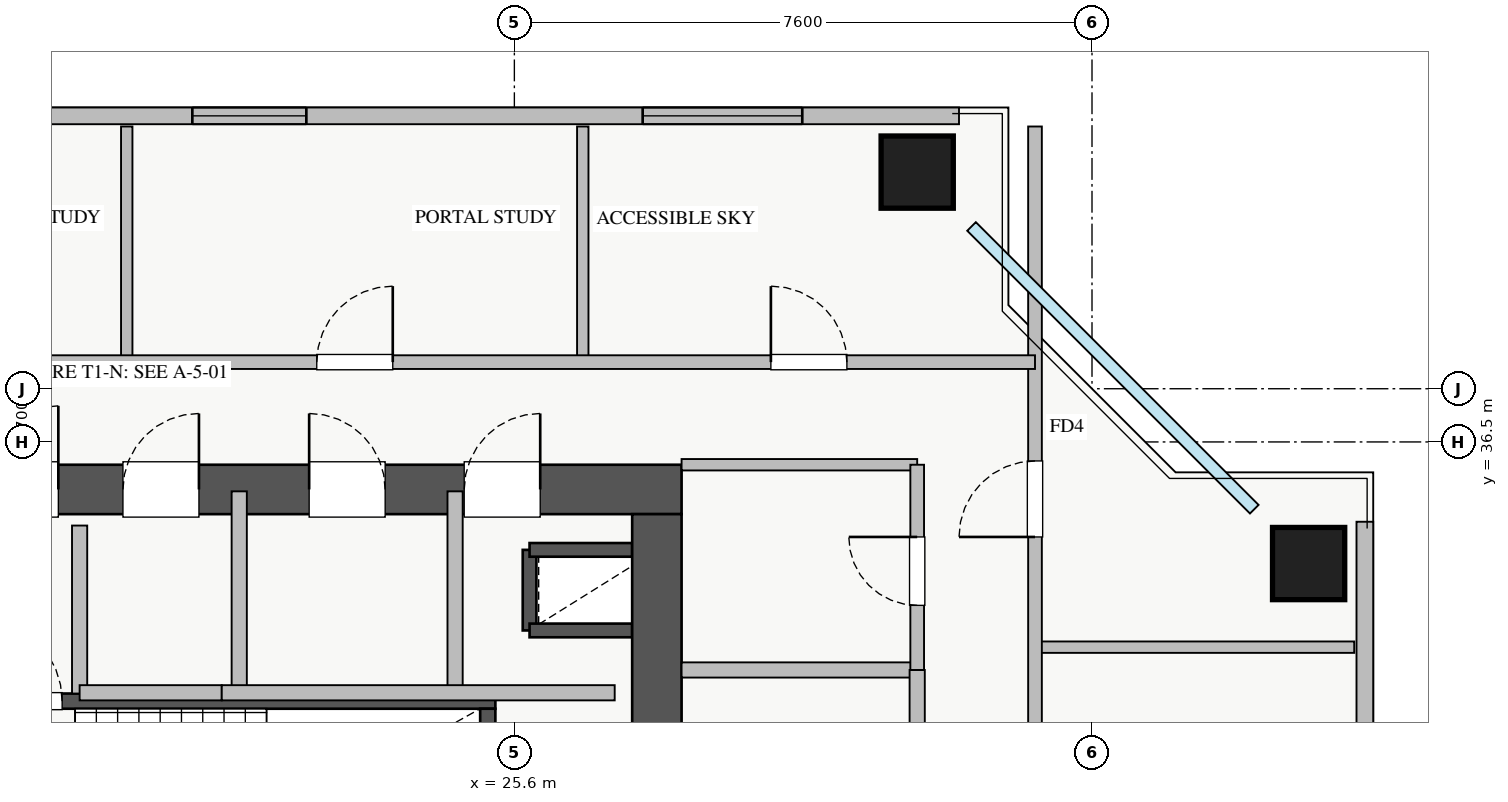
"""IFC4 building model, lengths in metres.
Left out: names, types, materials, properties, quantities, classifications, styles, units other than length and angle.
Written with IfcOpenShell. Run it as: python <this file> out.ifc"""

import sys

from ifc_helpers import new_model, si_unit, direction, frame, frame_2d, origin, origin_2d, place, context, subcontext, project, spatial, rectangle, extrude, source, transform, mapped, element, fill, save


model = new_model("IFC4")
c1 = context("Model", 3, precision=1e-05, world=origin(), true_north=direction((0.0, 1.0)))
c2 = subcontext(c1, "Body", "Model", "MODEL_VIEW")
j1 = project(units=[si_unit("LENGTHUNIT", "METRE"), si_unit("PLANEANGLEUNIT", "RADIAN")], contexts=[c1])
p1 = place(None, origin())
s1 = spatial("IfcSite", under=j1, at=p1, CompositionType="ELEMENT")
p2 = place(p1, origin())
s2 = spatial("IfcBuilding", under=s1, at=p2, CompositionType="ELEMENT")
p3 = place(p2, frame((0.0, 0.0, 169.75)))
s3 = spatial("IfcBuildingStorey", under=s2, at=p3, CompositionType="ELEMENT", Elevation=169.75)
p4 = place(p3, frame((25.8, 34.02, 0.0), z_axis=(0.0, 0.0, 1.0), x_axis=(0.0, 1.0, 0.0)))
e1 = element("IfcWall", 1, at=p4, inside=s3, PredefinedType="SHEAR", context=c2, shape_type="SweptSolid", body=[
    extrude(rectangle(XDim=1.06, YDim=0.18, at=frame_2d((0.53, 0.0))), origin(), (0.0, 0.0, 1.0), 3.0),
])
for number, where, z_axis, x_axis in (
    (2, (25.8, 35.08, 0.0), (0.0, 0.0, 1.0), (1.0, 0.0, 0.0)),
    (3, (25.8, 34.02, 0.0), (0.0, 0.0, 1.0), (1.0, 0.0, 0.0)),
):
    element("IfcWall", number, at=place(p3, frame(where, z_axis=z_axis, x_axis=x_axis)), inside=s3, PredefinedType="SHEAR", context=c2, shape_type="SweptSolid", body=[
        extrude(rectangle(XDim=1.35, YDim=0.18, at=frame_2d((0.675, 0.0))), origin(), (0.0, 0.0, 1.0), 3.0),
    ])
p5 = place(p3, frame((18.2, 33.09, 0.0), z_axis=(0.0, 0.0, 1.0), x_axis=(1.0, 0.0, 0.0)))
e4 = element("IfcWall", 4, at=p5, inside=s3, PredefinedType="SHEAR", context=c2, shape_type="SweptSolid", body=[
    extrude(rectangle(XDim=7.15, YDim=0.2, at=frame_2d((3.575, 0.0))), origin(), (0.0, 0.0, 1.0), 3.25),
])
p6 = place(p5, frame((0.35, 0.0, 0.0)))
e5 = element("IfcOpeningElement", 5, at=p6, cuts=e4, PredefinedType="OPENING", context=c2, shape_type="SweptSolid", body=[
    extrude(rectangle(XDim=1.1, YDim=2.05, at=frame_2d((0.55, 1.025))), frame((0.0, 0.11, 0.0), z_axis=(0.0, -1.0, 0.0), x_axis=(1.0, 0.0, 0.0)), (0.0, 0.0, 1.0), 0.22),
])
p7 = place(p3, frame((25.25, 30.05, 0.0), z_axis=(0.0, 0.0, 1.0), x_axis=(0.0, 1.0, 0.0)))
e6 = element("IfcWall", 6, at=p7, inside=s3, PredefinedType="SHEAR", context=c2, shape_type="SweptSolid", body=[
    extrude(rectangle(XDim=2.94, YDim=0.2, at=frame_2d((1.47, 0.0))), origin(), (0.0, 0.0, 1.0), 3.25),
])
p8 = place(p3, frame((10.2, 35.875, 0.0), z_axis=(0.0, 0.0, 1.0), x_axis=(1.0, 0.0, 0.0)))
e7 = element("IfcWall", 7, at=p8, inside=s3, PredefinedType="SHEAR", context=c2, shape_type="SweptSolid", body=[
    extrude(rectangle(XDim=17.6, YDim=0.65, at=frame_2d((8.8, 0.0))), origin(), (0.0, 0.0, 1.0), 3.25),
])
p9 = place(p8, frame((1.15, 0.0, 0.0)))
e8 = element("IfcOpeningElement", 8, at=p9, cuts=e7, PredefinedType="OPENING", context=c2, shape_type="SweptSolid", body=[
    extrude(rectangle(XDim=1.1, YDim=2.05, at=frame_2d((0.55, 1.025))), frame((0.0, 0.335, 0.0), z_axis=(0.0, -1.0, 0.0), x_axis=(1.0, 0.0, 0.0)), (0.0, 0.0, 1.0), 0.67),
])
p10 = place(p8, frame((8.3, 0.0, 0.0)))
e9 = element("IfcOpeningElement", 9, at=p10, cuts=e7, PredefinedType="OPENING", context=c2, shape_type="SweptSolid", body=[
    extrude(rectangle(XDim=1.1, YDim=2.05, at=frame_2d((0.55, 1.025))), frame((0.0, 0.335, 0.0), z_axis=(0.0, -1.0, 0.0), x_axis=(1.0, 0.0, 0.0)), (0.0, 0.0, 1.0), 0.67),
])
p11 = place(p8, frame((4.9, 0.0, 0.0)))
e10 = element("IfcOpeningElement", 10, at=p11, cuts=e7, PredefinedType="OPENING", context=c2, shape_type="SweptSolid", body=[
    extrude(rectangle(XDim=1.1, YDim=2.05, at=frame_2d((0.55, 1.025))), frame((0.0, 0.335, 0.0), z_axis=(0.0, -1.0, 0.0), x_axis=(1.0, 0.0, 0.0)), (0.0, 0.0, 1.0), 0.67),
])
p12 = place(p8, frame((14.74, 0.0, 0.0)))
e11 = element("IfcOpeningElement", 11, at=p12, cuts=e7, PredefinedType="OPENING", context=c2, shape_type="SweptSolid", body=[
    extrude(rectangle(XDim=1.0, YDim=2.05, at=frame_2d((0.5, 1.025))), frame((0.0, 0.335, 0.0), z_axis=(0.0, -1.0, 0.0), x_axis=(1.0, 0.0, 0.0)), (0.0, 0.0, 1.0), 0.67),
])
p13 = place(p8, frame((10.25, 0.0, 0.0)))
e12 = element("IfcOpeningElement", 12, at=p13, cuts=e7, PredefinedType="OPENING", context=c2, shape_type="SweptSolid", body=[
    extrude(rectangle(XDim=1.0, YDim=2.05, at=frame_2d((0.5, 1.025))), frame((0.0, 0.335, 0.0), z_axis=(0.0, -1.0, 0.0), x_axis=(1.0, 0.0, 0.0)), (0.0, 0.0, 1.0), 0.67),
])
p14 = place(p8, frame((12.7, 0.0, 0.0)))
e13 = element("IfcOpeningElement", 13, at=p14, cuts=e7, PredefinedType="OPENING", context=c2, shape_type="SweptSolid", body=[
    extrude(rectangle(XDim=1.0, YDim=2.05, at=frame_2d((0.5, 1.025))), frame((0.0, 0.335, 0.0), z_axis=(0.0, -1.0, 0.0), x_axis=(1.0, 0.0, 0.0)), (0.0, 0.0, 1.0), 0.67),
])
p15 = place(p3, frame((27.475, 29.65, 0.0), z_axis=(0.0, 0.0, 1.0), x_axis=(0.0, 1.0, 0.0)))
e14 = element("IfcWall", 14, at=p15, inside=s3, PredefinedType="SHEAR", context=c2, shape_type="SweptSolid", body=[
    extrude(rectangle(XDim=5.9, YDim=0.65, at=frame_2d((2.95, 0.0))), origin(), (0.0, 0.0, 1.0), 3.25),
])
p16 = place(p15, frame((1.1, 0.0, 0.0)))
e15 = element("IfcOpeningElement", 15, at=p16, cuts=e14, PredefinedType="OPENING", context=c2, shape_type="SweptSolid", body=[
    extrude(rectangle(XDim=1.3, YDim=2.05, at=frame_2d((0.65, 1.025))), frame((0.0, 0.335, 0.0), z_axis=(0.0, -1.0, 0.0), x_axis=(1.0, 0.0, 0.0)), (0.0, 0.0, 1.0), 0.67),
])
m1 = source(origin(), c2, "Body", "SweptSolid", [
    extrude(rectangle(XDim=0.95, YDim=0.95, at=origin_2d()), origin(), (0.0, 0.0, 1.0), 3.25),
])
for number, where, z_axis, x_axis in (
    (16, (36.05, 34.9, 0.0), (0.0, 0.0, 1.0), (1.0, 0.0, 0.0)),
    (17, (30.9, 40.05, 0.0), (0.0, 0.0, 1.0), (1.0, 0.0, 0.0)),
):
    element("IfcColumn", number, at=place(p3, frame(where, z_axis=z_axis, x_axis=x_axis)), inside=s3, PredefinedType="COLUMN", context=c2, shape_type="MappedRepresentation", body=[
        mapped(m1, transform((0.0, 0.0, 0.0), x_axis=(1.0, 0.0, 0.0), y_axis=(0.0, 1.0, 0.0), z_axis=(0.0, 0.0, 1.0), scale=1.0)),
    ])
p17 = place(p3, frame((36.79, 29.15, 0.0), z_axis=(0.0, 0.0, 1.0), x_axis=(0.0, 1.0, 0.0)))
e18 = element("IfcWall", 18, at=p17, inside=s3, PredefinedType="STANDARD", context=c2, shape_type="SweptSolid", body=[
    extrude(rectangle(XDim=6.3, YDim=0.22, at=frame_2d((3.15, 0.0))), origin(), (0.0, 0.0, 1.0), 2.54),
])
p18 = place(p3, frame((6.55, 40.79, 0.0), z_axis=(0.0, 0.0, 1.0), x_axis=(1.0, 0.0, 0.0)))
e19 = element("IfcWall", 19, at=p18, inside=s3, PredefinedType="STANDARD", context=c2, shape_type="SweptSolid", body=[
    extrude(rectangle(XDim=24.9, YDim=0.22, at=frame_2d((12.45, 0.0))), origin(), (0.0, 0.0, 1.0), 2.54),
])
p19 = place(p18, frame((3.833, 0.0, 0.9)))
e20 = element("IfcOpeningElement", 20, at=p19, cuts=e19, PredefinedType="OPENING", context=c2, shape_type="SweptSolid", body=[
    extrude(rectangle(XDim=2.4, YDim=1.5, at=frame_2d((1.2, 0.75))), frame((0.0, 0.12, 0.0), z_axis=(0.0, -1.0, 0.0), x_axis=(1.0, 0.0, 0.0)), (0.0, 0.0, 1.0), 0.24),
])
p20 = place(p18, frame((8.438, 0.0, 0.9)))
e21 = element("IfcOpeningElement", 21, at=p20, cuts=e19, PredefinedType="OPENING", context=c2, shape_type="SweptSolid", body=[
    extrude(rectangle(XDim=1.8, YDim=1.45, at=frame_2d((0.9, 0.725))), frame((0.0, 0.12, 0.0), z_axis=(0.0, -1.0, 0.0), x_axis=(1.0, 0.0, 0.0)), (0.0, 0.0, 1.0), 0.24),
])
p21 = place(p18, frame((14.813, 0.0, 0.9)))
e22 = element("IfcOpeningElement", 22, at=p21, cuts=e19, PredefinedType="OPENING", context=c2, shape_type="SweptSolid", body=[
    extrude(rectangle(XDim=1.5, YDim=1.45, at=frame_2d((0.75, 0.725))), frame((0.0, 0.12, 0.0), z_axis=(0.0, -1.0, 0.0), x_axis=(1.0, 0.0, 0.0)), (0.0, 0.0, 1.0), 0.24),
])
p22 = place(p18, frame((20.738, 0.0, 0.9)))
e23 = element("IfcOpeningElement", 23, at=p22, cuts=e19, PredefinedType="OPENING", context=c2, shape_type="SweptSolid", body=[
    extrude(rectangle(XDim=2.1, YDim=1.46, at=frame_2d((1.05, 0.73))), frame((0.0, 0.12, 0.0), z_axis=(0.0, -1.0, 0.0), x_axis=(1.0, 0.0, 0.0)), (0.0, 0.0, 1.0), 0.24),
])
p23 = place(p3, frame((27.8, 33.5, 0.0), z_axis=(0.0, 0.0, 1.0), x_axis=(1.0, 0.0, 0.0)))
e24 = element("IfcWall", 24, at=p23, inside=s3, PredefinedType="PARTITIONING", context=c2, shape_type="SweptSolid", body=[
    extrude(rectangle(XDim=3.1, YDim=0.2, at=frame_2d((1.55, 0.0))), origin(), (0.0, 0.0, 1.0), 3.0),
])
p24 = place(p3, frame((30.9, 29.6, 0.0), z_axis=(0.0, 0.0, 1.0), x_axis=(0.0, 1.0, 0.0)))
e25 = element("IfcWall", 25, at=p24, inside=s3, PredefinedType="PARTITIONING", context=c2, shape_type="SweptSolid", body=[
    extrude(rectangle(XDim=3.9, YDim=0.2, at=frame_2d((1.95, 0.0))), origin(), (0.0, 0.0, 1.0), 3.0),
])
p25 = place(p24, frame((1.4, 0.0, 0.0)))
e26 = element("IfcOpeningElement", 26, at=p25, cuts=e25, PredefinedType="OPENING", context=c2, shape_type="SweptSolid", body=[
    extrude(rectangle(XDim=1.1, YDim=2.05, at=frame_2d((0.55, 1.025))), frame((0.0, 0.11, 0.0), z_axis=(0.0, -1.0, 0.0), x_axis=(1.0, 0.0, 0.0)), (0.0, 0.0, 1.0), 0.22),
])
p26 = place(p3, frame((19.88, 33.19, 0.0), z_axis=(0.0, 0.0, 1.0), x_axis=(0.0, 1.0, 0.0)))
e27 = element("IfcWall", 27, at=p26, inside=s3, PredefinedType="PARTITIONING", context=c2, shape_type="SweptSolid", body=[
    extrude(rectangle(XDim=2.21, YDim=0.2, at=frame_2d((1.105, 0.0))), origin(), (0.0, 0.0, 1.0), 3.0),
])
p27 = place(p3, frame((24.82, 33.2, 0.0), z_axis=(0.0, 0.0, 1.0), x_axis=(0.0, 1.0, 0.0)))
e28 = element("IfcWall", 28, at=p27, inside=s3, PredefinedType="PARTITIONING", context=c2, shape_type="SweptSolid", body=[
    extrude(rectangle(XDim=2.65, YDim=0.2, at=frame_2d((1.325, 0.0))), origin(), (0.0, 0.0, 1.0), 3.0),
])
p28 = place(p3, frame((19.88, 33.2, 0.0), z_axis=(0.0, 0.0, 1.0), x_axis=(1.0, 0.0, 0.0)))
e29 = element("IfcWall", 29, at=p28, inside=s3, PredefinedType="PARTITIONING", context=c2, shape_type="SweptSolid", body=[
    extrude(rectangle(XDim=1.87, YDim=0.2, at=frame_2d((0.935, 0.0))), origin(), (0.0, 0.0, 1.0), 3.0),
])
p29 = place(p3, frame((21.98, 33.2, 0.0), z_axis=(0.0, 0.0, 1.0), x_axis=(0.0, 1.0, 0.0)))
e30 = element("IfcWall", 30, at=p29, inside=s3, PredefinedType="PARTITIONING", context=c2, shape_type="SweptSolid", body=[
    extrude(rectangle(XDim=2.65, YDim=0.2, at=frame_2d((1.325, 0.0))), origin(), (0.0, 0.0, 1.0), 3.0),
])
p30 = place(p3, frame((21.75, 33.2, 0.0), z_axis=(0.0, 0.0, 1.0), x_axis=(1.0, 0.0, 0.0)))
e31 = element("IfcWall", 31, at=p30, inside=s3, PredefinedType="PARTITIONING", context=c2, shape_type="SweptSolid", body=[
    extrude(rectangle(XDim=5.17, YDim=0.2, at=frame_2d((2.585, 0.0))), origin(), (0.0, 0.0, 1.0), 3.0),
])
p31 = place(p3, frame((27.8, 36.2, 0.0), z_axis=(0.0, 0.0, 1.0), x_axis=(1.0, 0.0, 0.0)))
e32 = element("IfcWall", 32, at=p31, inside=s3, PredefinedType="PARTITIONING", context=c2, shape_type="SweptSolid", body=[
    extrude(rectangle(XDim=3.1, YDim=0.15, at=frame_2d((1.55, 0.0))), origin(), (0.0, 0.0, 1.0), 3.0),
])
p32 = place(p3, frame((30.9, 33.5, 0.0), z_axis=(0.0, 0.0, 1.0), x_axis=(0.0, 1.0, 0.0)))
e33 = element("IfcWall", 33, at=p32, inside=s3, PredefinedType="PARTITIONING", context=c2, shape_type="SweptSolid", body=[
    extrude(rectangle(XDim=2.7, YDim=0.18, at=frame_2d((1.35, 0.0))), origin(), (0.0, 0.0, 1.0), 2.495),
])
p33 = place(p32, frame((0.85, 0.0, 0.0)))
e34 = element("IfcOpeningElement", 34, at=p33, cuts=e33, PredefinedType="OPENING", context=c2, shape_type="SweptSolid", body=[
    extrude(rectangle(XDim=0.9, YDim=2.05, at=frame_2d((0.45, 1.025))), frame((0.0, 0.1, 0.0), z_axis=(0.0, -1.0, 0.0), x_axis=(1.0, 0.0, 0.0)), (0.0, 0.0, 1.0), 0.2),
])
p34 = place(p3, frame((32.45, 33.8, 0.0), z_axis=(0.0, 0.0, 1.0), x_axis=(1.0, 0.0, 0.0)))
e35 = element("IfcWall", 35, at=p34, inside=s3, PredefinedType="PARTITIONING", context=c2, shape_type="SweptSolid", body=[
    extrude(rectangle(XDim=4.2, YDim=0.15, at=frame_2d((2.1, 0.0))), origin(), (0.0, 0.0, 1.0), 3.0),
])
p35 = place(p3, frame((32.45, 29.3, 0.0), z_axis=(0.0, 0.0, 1.0), x_axis=(0.0, 1.0, 0.0)))
e36 = element("IfcWall", 36, at=p35, inside=s3, PredefinedType="PARTITIONING", context=c2, shape_type="SweptSolid", body=[
    extrude(rectangle(XDim=11.35, YDim=0.18, at=frame_2d((5.675, 0.0))), origin(), (0.0, 0.0, 1.0), 3.0),
])
p36 = place(p35, frame((1.9, 0.0, 0.0)))
e37 = element("IfcOpeningElement", 37, at=p36, cuts=e36, PredefinedType="OPENING", context=c2, shape_type="SweptSolid", body=[
    extrude(rectangle(XDim=1.0, YDim=2.05, at=frame_2d((0.5, 1.025))), frame((0.0, 0.1, 0.0), z_axis=(0.0, -1.0, 0.0), x_axis=(1.0, 0.0, 0.0)), (0.0, 0.0, 1.0), 0.2),
])
p37 = place(p35, frame((5.95, 0.0, 0.0)))
e38 = element("IfcOpeningElement", 38, at=p37, cuts=e36, PredefinedType="OPENING", context=c2, shape_type="SweptSolid", body=[
    extrude(rectangle(XDim=1.0, YDim=2.05, at=frame_2d((0.5, 1.025))), frame((0.0, 0.1, 0.0), z_axis=(0.0, -1.0, 0.0), x_axis=(1.0, 0.0, 0.0)), (0.0, 0.0, 1.0), 0.2),
])
for number, where, z_axis, x_axis in (
    (39, (20.5, 37.55, 0.0), (0.0, 0.0, 1.0), (0.0, 1.0, 0.0)),
    (40, (26.5, 37.55, 0.0), (0.0, 0.0, 1.0), (0.0, 1.0, 0.0)),
):
    element("IfcWall", number, at=place(p3, frame(where, z_axis=z_axis, x_axis=x_axis)), inside=s3, PredefinedType="PARTITIONING", context=c2, shape_type="SweptSolid", body=[
        extrude(rectangle(XDim=3.1, YDim=0.15, at=frame_2d((1.55, 0.0))), origin(), (0.0, 0.0, 1.0), 3.0),
    ])
p38 = place(p3, frame((8.65, 37.55, 0.0), z_axis=(0.0, 0.0, 1.0), x_axis=(1.0, 0.0, 0.0)))
e41 = element("IfcWall", 41, at=p38, inside=s3, PredefinedType="PARTITIONING", context=c2, shape_type="SweptSolid", body=[
    extrude(rectangle(XDim=23.8, YDim=0.18, at=frame_2d((11.9, 0.0))), origin(), (0.0, 0.0, 1.0), 3.0),
])
p39 = place(p38, frame((2.425, 0.0, 0.0)))
e42 = element("IfcOpeningElement", 42, at=p39, cuts=e41, PredefinedType="OPENING", context=c2, shape_type="SweptSolid", body=[
    extrude(rectangle(XDim=1.0, YDim=2.05, at=frame_2d((0.5, 1.025))), frame((0.0, 0.1, 0.0), z_axis=(0.0, -1.0, 0.0), x_axis=(1.0, 0.0, 0.0)), (0.0, 0.0, 1.0), 0.2),
])
p40 = place(p38, frame((8.35, 0.0, 0.0)))
e43 = element("IfcOpeningElement", 43, at=p40, cuts=e41, PredefinedType="OPENING", context=c2, shape_type="SweptSolid", body=[
    extrude(rectangle(XDim=1.0, YDim=2.05, at=frame_2d((0.5, 1.025))), frame((0.0, 0.1, 0.0), z_axis=(0.0, -1.0, 0.0), x_axis=(1.0, 0.0, 0.0)), (0.0, 0.0, 1.0), 0.2),
])
p41 = place(p38, frame((14.35, 0.0, 0.0)))
e44 = element("IfcOpeningElement", 44, at=p41, cuts=e41, PredefinedType="OPENING", context=c2, shape_type="SweptSolid", body=[
    extrude(rectangle(XDim=1.0, YDim=2.05, at=frame_2d((0.5, 1.025))), frame((0.0, 0.1, 0.0), z_axis=(0.0, -1.0, 0.0), x_axis=(1.0, 0.0, 0.0)), (0.0, 0.0, 1.0), 0.2),
])
p42 = place(p38, frame((20.325, 0.0, 0.0)))
e45 = element("IfcOpeningElement", 45, at=p42, cuts=e41, PredefinedType="OPENING", context=c2, shape_type="SweptSolid", body=[
    extrude(rectangle(XDim=1.0, YDim=2.05, at=frame_2d((0.5, 1.025))), frame((0.0, 0.1, 0.0), z_axis=(0.0, -1.0, 0.0), x_axis=(1.0, 0.0, 0.0)), (0.0, 0.0, 1.0), 0.2),
])
m2 = source(origin(), c2, "Body", "SweptSolid", [
    extrude(rectangle(XDim=1.5, YDim=1.45, at=frame_2d((0.75, 0.725))), frame((0.0, 0.03, 0.0), z_axis=(0.0, -1.0, 0.0), x_axis=(1.0, 0.0, 0.0)), (0.0, 0.0, 1.0), 0.06),
])
p43 = place(p21, origin())
e46 = element("IfcWindow", 46, at=p43, inside=s3, PartitioningType="DOUBLE_PANEL_VERTICAL", PredefinedType="WINDOW", context=c2, shape_type="MappedRepresentation", body=[
    mapped(m2, transform((0.0, 0.0, 0.0), x_axis=(1.0, 0.0, 0.0), y_axis=(0.0, 1.0, 0.0), z_axis=(0.0, 0.0, 1.0), scale=1.0)),
])
fill(e22, e46)
m3 = source(origin(), c2, "Body", "SweptSolid", [
    extrude(rectangle(XDim=2.1, YDim=1.46, at=frame_2d((1.05, 0.73))), frame((0.0, 0.03, 0.0), z_axis=(0.0, -1.0, 0.0), x_axis=(1.0, 0.0, 0.0)), (0.0, 0.0, 1.0), 0.06),
])
p44 = place(p22, origin())
e47 = element("IfcWindow", 47, at=p44, inside=s3, PartitioningType="TRIPLE_PANEL_VERTICAL", PredefinedType="WINDOW", context=c2, shape_type="MappedRepresentation", body=[
    mapped(m3, transform((0.0, 0.0, 0.0), x_axis=(1.0, 0.0, 0.0), y_axis=(0.0, 1.0, 0.0), z_axis=(0.0, 0.0, 1.0), scale=1.0)),
])
fill(e23, e47)
m4 = source(origin(), c2, "Body", "SweptSolid", [
    extrude(rectangle(XDim=1.1, YDim=2.05, at=frame_2d((0.55, 1.025))), frame((0.0, 0.025, 0.0), z_axis=(0.0, -1.0, 0.0), x_axis=(1.0, 0.0, 0.0)), (0.0, 0.0, 1.0), 0.05),
])
p45 = place(p10, origin())
e48 = element("IfcDoor", 48, at=p45, inside=s3, OperationType="SINGLE_SWING_RIGHT", PredefinedType="DOOR", context=c2, shape_type="MappedRepresentation", body=[
    mapped(m4, transform((0.0, 0.0, 0.0), x_axis=(1.0, 0.0, 0.0), y_axis=(0.0, 1.0, 0.0), z_axis=(0.0, 0.0, 1.0), scale=1.0)),
])
fill(e9, e48)
p46 = place(p6, origin())
e49 = element("IfcDoor", 49, at=p46, inside=s3, OperationType="SINGLE_SWING_LEFT", PredefinedType="DOOR", context=c2, shape_type="MappedRepresentation", body=[
    mapped(m4, transform((0.0, 0.0, 0.0), x_axis=(1.0, 0.0, 0.0), y_axis=(0.0, 1.0, 0.0), z_axis=(0.0, 0.0, 1.0), scale=1.0)),
])
fill(e5, e49)
m5 = source(origin(), c2, "Body", "SweptSolid", [
    extrude(rectangle(XDim=1.0, YDim=2.05, at=frame_2d((0.5, 1.025))), frame((0.0, 0.025, 0.0), z_axis=(0.0, -1.0, 0.0), x_axis=(1.0, 0.0, 0.0)), (0.0, 0.0, 1.0), 0.05),
])
p47 = place(p12, origin())
e50 = element("IfcDoor", 50, at=p47, inside=s3, OperationType="SINGLE_SWING_RIGHT", PredefinedType="DOOR", context=c2, shape_type="MappedRepresentation", body=[
    mapped(m5, transform((0.0, 0.0, 0.0), x_axis=(1.0, 0.0, 0.0), y_axis=(0.0, 1.0, 0.0), z_axis=(0.0, 0.0, 1.0), scale=1.0)),
])
fill(e11, e50)
p48 = place(p13, origin())
e51 = element("IfcDoor", 51, at=p48, inside=s3, OperationType="SINGLE_SWING_RIGHT", PredefinedType="DOOR", context=c2, shape_type="MappedRepresentation", body=[
    mapped(m5, transform((0.0, 0.0, 0.0), x_axis=(1.0, 0.0, 0.0), y_axis=(0.0, 1.0, 0.0), z_axis=(0.0, 0.0, 1.0), scale=1.0)),
])
fill(e12, e51)
p49 = place(p14, origin())
e52 = element("IfcDoor", 52, at=p49, inside=s3, OperationType="SINGLE_SWING_LEFT", PredefinedType="DOOR", context=c2, shape_type="MappedRepresentation", body=[
    mapped(m5, transform((0.0, 0.0, 0.0), x_axis=(1.0, 0.0, 0.0), y_axis=(0.0, 1.0, 0.0), z_axis=(0.0, 0.0, 1.0), scale=1.0)),
])
fill(e13, e52)
m6 = source(origin(), c2, "Body", "SweptSolid", [
    extrude(rectangle(XDim=0.9, YDim=2.05, at=frame_2d((0.45, 1.025))), frame((0.0, 0.025, 0.0), z_axis=(0.0, -1.0, 0.0), x_axis=(1.0, 0.0, 0.0)), (0.0, 0.0, 1.0), 0.05),
])
p50 = place(p33, origin())
e53 = element("IfcDoor", 53, at=p50, inside=s3, OperationType="SINGLE_SWING_RIGHT", PredefinedType="DOOR", context=c2, shape_type="MappedRepresentation", body=[
    mapped(m6, transform((0.0, 0.0, 0.0), x_axis=(1.0, 0.0, 0.0), y_axis=(0.0, 1.0, 0.0), z_axis=(0.0, 0.0, 1.0), scale=1.0)),
])
fill(e34, e53)
p51 = place(p37, origin())
e54 = element("IfcDoor", 54, at=p51, inside=s3, OperationType="SINGLE_SWING_LEFT", PredefinedType="DOOR", context=c2, shape_type="MappedRepresentation", body=[
    mapped(m5, transform((0.0, 0.0, 0.0), x_axis=(1.0, 0.0, 0.0), y_axis=(0.0, 1.0, 0.0), z_axis=(0.0, 0.0, 1.0), scale=1.0)),
])
fill(e38, e54)
p52 = place(p41, origin())
e55 = element("IfcDoor", 55, at=p52, inside=s3, OperationType="SINGLE_SWING_RIGHT", PredefinedType="DOOR", context=c2, shape_type="MappedRepresentation", body=[
    mapped(m5, transform((0.0, 0.0, 0.0), x_axis=(1.0, 0.0, 0.0), y_axis=(0.0, 1.0, 0.0), z_axis=(0.0, 0.0, 1.0), scale=1.0)),
])
fill(e44, e55)
p53 = place(p42, origin())
e56 = element("IfcDoor", 56, at=p53, inside=s3, OperationType="SINGLE_SWING_LEFT", PredefinedType="DOOR", context=c2, shape_type="MappedRepresentation", body=[
    mapped(m5, transform((0.0, 0.0, 0.0), x_axis=(1.0, 0.0, 0.0), y_axis=(0.0, 1.0, 0.0), z_axis=(0.0, 0.0, 1.0), scale=1.0)),
])
fill(e45, e56)
save(model, sys.argv[1])
